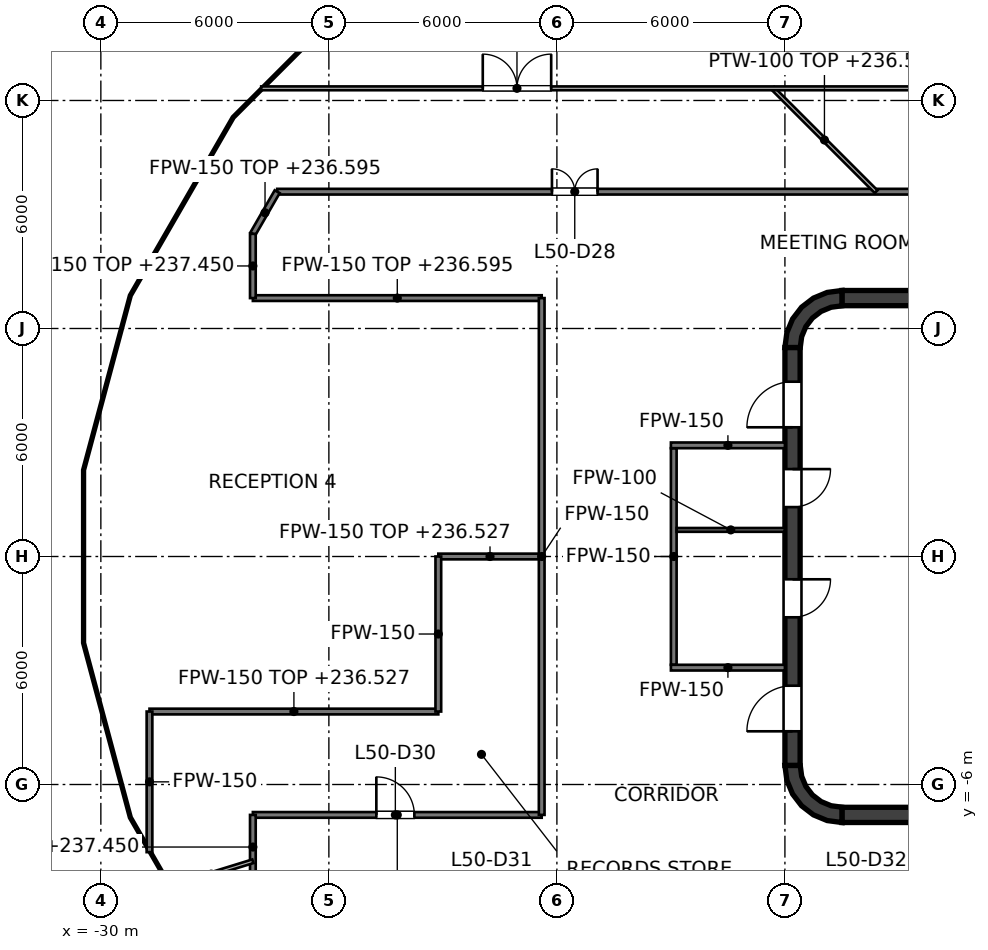
"""IFC4 building model, lengths in metres.
Left out: names, types, materials, properties, quantities, classifications, styles, units other than length and angle.
Written with IfcOpenShell. Run it as: python <this file> out.ifc"""

import sys

from ifc_helpers import new_model, si_unit, direction, frame, frame_2d, origin, place, context, subcontext, project, spatial, polyline, rectangle, outline, extrude, element, fill, save


model = new_model("IFC4")
c1 = context("Model", 3, precision=1e-05, world=origin(), true_north=direction((0.0, 1.0)))
c2 = subcontext(c1, "Body", "Model", "MODEL_VIEW")
j1 = project(units=[si_unit("LENGTHUNIT", "METRE"), si_unit("PLANEANGLEUNIT", "RADIAN")], contexts=[c1])
p1 = place(None, origin())
s1 = spatial("IfcSite", under=j1, at=p1, CompositionType="ELEMENT")
p2 = place(p1, origin())
s2 = spatial("IfcBuilding", under=s1, at=p2, CompositionType="ELEMENT")
p3 = place(p2, frame((0.0, 0.0, 233.6)))
s3 = spatial("IfcBuildingStorey", under=s2, at=p3, CompositionType="ELEMENT", Elevation=233.6)
for number, where, z_axis, x_axis in (
    (1, (-10.5, 6.8, 0.0), (0.0, 0.0, 1.0), (1.0, 0.0, 0.0)),
    (2, (-10.5, -6.8, 0.0), (0.0, 0.0, 1.0), (1.0, 0.0, 0.0)),
):
    element("IfcWall", number, at=place(p3, frame(where, z_axis=z_axis, x_axis=x_axis)), inside=s3, PredefinedType="SHEAR", context=c2, shape_type="SweptSolid", body=[
        extrude(rectangle(XDim=21.0, YDim=0.4, at=frame_2d((10.5, 0.0))), origin(), (0.0, 0.0, 1.0), 4.0),
    ])
p4 = place(p3, frame((-11.8, -5.5, 0.0), z_axis=(0.0, 0.0, 1.0), x_axis=(0.0, 1.0, 0.0)))
e3 = element("IfcWall", 3, at=p4, inside=s3, PredefinedType="SHEAR", context=c2, shape_type="SweptSolid", body=[
    extrude(rectangle(XDim=11.0, YDim=0.4, at=frame_2d((5.5, 0.0))), origin(), (0.0, 0.0, 1.0), 4.0),
])
p5 = place(p4, frame((3.9, 0.0, 0.0)))
e4 = element("IfcOpeningElement", 4, at=p5, cuts=e3, PredefinedType="OPENING", context=c2, shape_type="SweptSolid", body=[
    extrude(rectangle(XDim=1.0, YDim=2.1, at=frame_2d((0.5, 1.05))), frame((0.0, 0.2, 0.0), z_axis=(0.0, -1.0, 0.0), x_axis=(1.0, 0.0, 0.0)), (0.0, 0.0, 1.0), 0.4),
])
p6 = place(p4, frame((6.8, 0.0, 0.0)))
e5 = element("IfcOpeningElement", 5, at=p6, cuts=e3, PredefinedType="OPENING", context=c2, shape_type="SweptSolid", body=[
    extrude(rectangle(XDim=1.0, YDim=2.1, at=frame_2d((0.5, 1.05))), frame((0.0, 0.2, 0.0), z_axis=(0.0, -1.0, 0.0), x_axis=(1.0, 0.0, 0.0)), (0.0, 0.0, 1.0), 0.4),
])
p7 = place(p4, frame((0.9, 0.0, 0.0)))
e6 = element("IfcOpeningElement", 6, at=p7, cuts=e3, PredefinedType="OPENING", context=c2, shape_type="SweptSolid", body=[
    extrude(rectangle(XDim=1.2, YDim=2.1, at=frame_2d((0.6, 1.05))), frame((0.0, 0.2, 0.0), z_axis=(0.0, -1.0, 0.0), x_axis=(1.0, 0.0, 0.0)), (0.0, 0.0, 1.0), 0.4),
])
p8 = place(p4, frame((8.9, 0.0, 0.0)))
e7 = element("IfcOpeningElement", 7, at=p8, cuts=e3, PredefinedType="OPENING", context=c2, shape_type="SweptSolid", body=[
    extrude(rectangle(XDim=1.2, YDim=2.1, at=frame_2d((0.6, 1.05))), frame((0.0, 0.2, 0.0), z_axis=(0.0, -1.0, 0.0), x_axis=(1.0, 0.0, 0.0)), (0.0, 0.0, 1.0), 0.4),
])
p9 = place(p3, origin())
e8 = element("IfcWall", 8, at=p9, inside=s3, PredefinedType="SHEAR", context=c2, shape_type="SweptSolid", body=[
    extrude(outline(polyline([(-12.0, 5.5), (-11.596, 5.5), (-11.559, 5.784), (-11.45, 6.048), (-11.275, 6.275), (-11.048, 6.45), (-10.784, 6.559), (-10.5, 6.596), (-10.5, 7.0), (-10.888, 6.949), (-11.25, 6.799), (-11.561, 6.561), (-11.799, 6.25), (-11.949, 5.888), (-12.0, 5.5)])), origin(), (0.0, 0.0, 1.0), 4.0),
])
e9 = element("IfcWall", 9, at=p9, inside=s3, PredefinedType="SHEAR", context=c2, shape_type="SweptSolid", body=[
    extrude(outline(polyline([(-10.5, -7.0), (-10.5, -6.596), (-10.784, -6.559), (-11.048, -6.45), (-11.275, -6.275), (-11.45, -6.048), (-11.559, -5.784), (-11.596, -5.5), (-12.0, -5.5), (-11.949, -5.888), (-11.799, -6.25), (-11.561, -6.561), (-11.25, -6.799), (-10.888, -6.949), (-10.5, -7.0)])), origin(), (0.0, 0.0, 1.0), 4.0),
])
p10 = place(p3, frame((-9.0, 4.1, 0.0), z_axis=(0.0, 0.0, 1.0), x_axis=(0.0, 1.0, 0.0)))
e10 = element("IfcWall", 10, at=p10, inside=s3, PredefinedType="SOLIDWALL", context=c2, shape_type="SweptSolid", body=[
    extrude(rectangle(XDim=2.5, YDim=0.25, at=frame_2d((1.25, 0.0))), origin(), (0.0, 0.0, 1.0), 3.85),
])
p11 = place(p10, frame((0.65, 0.0, 0.0)))
e11 = element("IfcOpeningElement", 11, at=p11, cuts=e10, PredefinedType="OPENING", context=c2, shape_type="SweptSolid", body=[
    extrude(rectangle(XDim=1.2, YDim=2.1, at=frame_2d((0.6, 1.05))), frame((0.0, 0.125, 0.0), z_axis=(0.0, -1.0, 0.0), x_axis=(1.0, 0.0, 0.0)), (0.0, 0.0, 1.0), 0.25),
])
p12 = place(p3, frame((-9.0, -6.6, 0.0), z_axis=(0.0, 0.0, 1.0), x_axis=(0.0, 1.0, 0.0)))
e12 = element("IfcWall", 12, at=p12, inside=s3, PredefinedType="PARTITIONING", context=c2, shape_type="SweptSolid", body=[
    extrude(rectangle(XDim=2.5, YDim=0.25, at=frame_2d((1.25, 0.0))), origin(), (0.0, 0.0, 1.0), 3.85),
])
p13 = place(p12, frame((0.75, 0.0, 0.0)))
e13 = element("IfcOpeningElement", 13, at=p13, cuts=e12, PredefinedType="OPENING", context=c2, shape_type="SweptSolid", body=[
    extrude(rectangle(XDim=1.0, YDim=2.1, at=frame_2d((0.5, 1.05))), frame((0.0, 0.125, 0.0), z_axis=(0.0, -1.0, 0.0), x_axis=(1.0, 0.0, 0.0)), (0.0, 0.0, 1.0), 0.25),
])
p14 = place(p3, frame((-9.125, 1.525, 0.0), z_axis=(0.0, 0.0, 1.0), x_axis=(1.0, 0.0, 0.0)))
e14 = element("IfcWall", 14, at=p14, inside=s3, PredefinedType="SOLIDWALL", context=c2, shape_type="SweptSolid", body=[
    extrude(rectangle(XDim=8.35, YDim=0.25, at=frame_2d((4.175, 0.0))), origin(), (0.0, 0.0, 1.0), 3.85),
])
p15 = place(p14, frame((0.925, 0.0, 0.0)))
e15 = element("IfcOpeningElement", 15, at=p15, cuts=e14, PredefinedType="OPENING", context=c2, shape_type="SweptSolid", body=[
    extrude(rectangle(XDim=1.1, YDim=2.1, at=frame_2d((0.55, 1.05))), frame((0.0, 0.125, 0.0), z_axis=(0.0, -1.0, 0.0), x_axis=(1.0, 0.0, 0.0)), (0.0, 0.0, 1.0), 0.25),
])
p16 = place(p14, frame((3.625, 0.0, 0.0)))
e16 = element("IfcOpeningElement", 16, at=p16, cuts=e14, PredefinedType="OPENING", context=c2, shape_type="SweptSolid", body=[
    extrude(rectangle(XDim=1.1, YDim=2.1, at=frame_2d((0.55, 1.05))), frame((0.0, 0.125, 0.0), z_axis=(0.0, -1.0, 0.0), x_axis=(1.0, 0.0, 0.0)), (0.0, 0.0, 1.0), 0.25),
])
p17 = place(p14, frame((6.325, 0.0, 0.0)))
e17 = element("IfcOpeningElement", 17, at=p17, cuts=e14, PredefinedType="OPENING", context=c2, shape_type="SweptSolid", body=[
    extrude(rectangle(XDim=1.1, YDim=2.1, at=frame_2d((0.55, 1.05))), frame((0.0, 0.125, 0.0), z_axis=(0.0, -1.0, 0.0), x_axis=(1.0, 0.0, 0.0)), (0.0, 0.0, 1.0), 0.25),
])
p18 = place(p3, frame((-9.125, 3.975, 0.0), z_axis=(0.0, 0.0, 1.0), x_axis=(1.0, 0.0, 0.0)))
e18 = element("IfcWall", 18, at=p18, inside=s3, PredefinedType="SOLIDWALL", context=c2, shape_type="SweptSolid", body=[
    extrude(rectangle(XDim=8.35, YDim=0.25, at=frame_2d((4.175, 0.0))), origin(), (0.0, 0.0, 1.0), 3.85),
])
p19 = place(p3, frame((-9.0, 1.65, 0.0), z_axis=(0.0, 0.0, 1.0), x_axis=(0.0, 1.0, 0.0)))
e19 = element("IfcWall", 19, at=p19, inside=s3, PredefinedType="SOLIDWALL", context=c2, shape_type="SweptSolid", body=[
    extrude(rectangle(XDim=2.2, YDim=0.25, at=frame_2d((1.1, 0.0))), origin(), (0.0, 0.0, 1.0), 3.85),
])
p20 = place(p3, frame((-9.125, -1.525, 0.0), z_axis=(0.0, 0.0, 1.0), x_axis=(1.0, 0.0, 0.0)))
e20 = element("IfcWall", 20, at=p20, inside=s3, PredefinedType="SOLIDWALL", context=c2, shape_type="SweptSolid", body=[
    extrude(rectangle(XDim=18.25, YDim=0.25, at=frame_2d((9.125, 0.0))), origin(), (0.0, 0.0, 1.0), 3.85),
])
p21 = place(p20, frame((7.15, 0.0, 0.0)))
e21 = element("IfcOpeningElement", 21, at=p21, cuts=e20, PredefinedType="OPENING", context=c2, shape_type="SweptSolid", body=[
    extrude(rectangle(XDim=1.2, YDim=2.1, at=frame_2d((0.6, 1.05))), frame((0.0, 0.125, 0.0), z_axis=(0.0, -1.0, 0.0), x_axis=(1.0, 0.0, 0.0)), (0.0, 0.0, 1.0), 0.25),
])
p22 = place(p20, frame((10.2, 0.0, 0.0)))
e22 = element("IfcOpeningElement", 22, at=p22, cuts=e20, PredefinedType="OPENING", context=c2, shape_type="SweptSolid", body=[
    extrude(rectangle(XDim=1.2, YDim=2.1, at=frame_2d((0.6, 1.05))), frame((0.0, 0.125, 0.0), z_axis=(0.0, -1.0, 0.0), x_axis=(1.0, 0.0, 0.0)), (0.0, 0.0, 1.0), 0.25),
])
p23 = place(p20, frame((16.075, 0.0, 0.0)))
e23 = element("IfcOpeningElement", 23, at=p23, cuts=e20, PredefinedType="OPENING", context=c2, shape_type="SweptSolid", body=[
    extrude(rectangle(XDim=1.0, YDim=2.1, at=frame_2d((0.5, 1.05))), frame((0.0, 0.125, 0.0), z_axis=(0.0, -1.0, 0.0), x_axis=(1.0, 0.0, 0.0)), (0.0, 0.0, 1.0), 0.25),
])
p24 = place(p3, frame((-9.125, -3.975, 0.0), z_axis=(0.0, 0.0, 1.0), x_axis=(1.0, 0.0, 0.0)))
e24 = element("IfcWall", 24, at=p24, inside=s3, PredefinedType="SOLIDWALL", context=c2, shape_type="SweptSolid", body=[
    extrude(rectangle(XDim=12.4, YDim=0.25, at=frame_2d((6.2, 0.0))), origin(), (0.0, 0.0, 1.0), 3.85),
])
p25 = place(p24, frame((1.05, 0.0, 0.0)))
e25 = element("IfcOpeningElement", 25, at=p25, cuts=e24, PredefinedType="OPENING", context=c2, shape_type="SweptSolid", body=[
    extrude(rectangle(XDim=1.2, YDim=2.1, at=frame_2d((0.6, 1.05))), frame((0.0, 0.125, 0.0), z_axis=(0.0, -1.0, 0.0), x_axis=(1.0, 0.0, 0.0)), (0.0, 0.0, 1.0), 0.25),
])
p26 = place(p24, frame((4.1, 0.0, 0.0)))
e26 = element("IfcOpeningElement", 26, at=p26, cuts=e24, PredefinedType="OPENING", context=c2, shape_type="SweptSolid", body=[
    extrude(rectangle(XDim=1.2, YDim=2.1, at=frame_2d((0.6, 1.05))), frame((0.0, 0.125, 0.0), z_axis=(0.0, -1.0, 0.0), x_axis=(1.0, 0.0, 0.0)), (0.0, 0.0, 1.0), 0.25),
])
p27 = place(p3, frame((-9.0, -3.85, 0.0), z_axis=(0.0, 0.0, 1.0), x_axis=(0.0, 1.0, 0.0)))
e27 = element("IfcWall", 27, at=p27, inside=s3, PredefinedType="SOLIDWALL", context=c2, shape_type="SweptSolid", body=[
    extrude(rectangle(XDim=2.2, YDim=0.25, at=frame_2d((1.1, 0.0))), origin(), (0.0, 0.0, 1.0), 3.85),
])
p28 = place(p3, frame((-14.925, -2.85, 0.0), z_axis=(0.0, 0.0, 1.0), x_axis=(0.0, 1.0, 0.0)))
e28 = element("IfcWall", 28, at=p28, inside=s3, PredefinedType="PARTITIONING", context=c2, shape_type="SweptSolid", body=[
    extrude(rectangle(XDim=5.7, YDim=0.15, at=frame_2d((2.85, 0.0))), origin(), (0.0, 0.0, 1.0), 2.918),
])
for number, where, z_axis, x_axis in (
    (29, (-15.0, 2.925, 0.0), (0.0, 0.0, 1.0), (1.0, 0.0, 0.0)),
    (30, (-15.0, -2.925, 0.0), (0.0, 0.0, 1.0), (1.0, 0.0, 0.0)),
):
    element("IfcWall", number, at=place(p3, frame(where, z_axis=z_axis, x_axis=x_axis)), inside=s3, PredefinedType="PARTITIONING", context=c2, shape_type="SweptSolid", body=[
        extrude(rectangle(XDim=3.0, YDim=0.15, at=frame_2d((1.5, 0.0))), origin(), (0.0, 0.0, 1.0), 2.918),
    ])
p29 = place(p3, frame((-14.85, 0.7, 0.0), z_axis=(0.0, 0.0, 1.0), x_axis=(1.0, 0.0, 0.0)))
e31 = element("IfcWall", 31, at=p29, inside=s3, PredefinedType="PARTITIONING", context=c2, shape_type="SweptSolid", body=[
    extrude(rectangle(XDim=2.85, YDim=0.1, at=frame_2d((1.425, 0.0))), origin(), (0.0, 0.0, 1.0), 2.918),
])
p30 = place(p3, frame((-26.0, -6.8, 0.0), z_axis=(0.0, 0.0, 1.0), x_axis=(1.0, 0.0, 0.0)))
e32 = element("IfcWall", 32, at=p30, inside=s3, PredefinedType="PARTITIONING", context=c2, shape_type="SweptSolid", body=[
    extrude(rectangle(XDim=7.6, YDim=0.15, at=frame_2d((3.8, 0.0))), origin(), (0.0, 0.0, 1.0), 2.995),
])
p31 = place(p30, frame((3.249, 0.0, 0.0)))
e33 = element("IfcOpeningElement", 33, at=p31, cuts=e32, PredefinedType="OPENING", context=c2, shape_type="SweptSolid", body=[
    extrude(rectangle(XDim=1.0, YDim=2.1, at=frame_2d((0.5, 1.05))), frame((0.0, 0.075, 0.0), z_axis=(0.0, -1.0, 0.0), x_axis=(1.0, 0.0, 0.0)), (0.0, 0.0, 1.0), 0.15),
])
p32 = place(p3, frame((-28.72, -4.08, 0.0), z_axis=(0.0, 0.0, 1.0), x_axis=(1.0, 0.0, 0.0)))
e34 = element("IfcWall", 34, at=p32, inside=s3, PredefinedType="PARTITIONING", context=c2, shape_type="SweptSolid", body=[
    extrude(rectangle(XDim=7.6, YDim=0.15, at=frame_2d((3.8, 0.0))), origin(), (0.0, 0.0, 1.0), 2.927),
])
p33 = place(p3, frame((-21.12, 0.0, 0.0), z_axis=(0.0, 0.0, 1.0), x_axis=(1.0, 0.0, 0.0)))
e35 = element("IfcWall", 35, at=p33, inside=s3, PredefinedType="PARTITIONING", context=c2, shape_type="SweptSolid", body=[
    extrude(rectangle(XDim=2.72, YDim=0.15, at=frame_2d((1.36, 0.0))), origin(), (0.0, 0.0, 1.0), 2.927),
])
p34 = place(p3, frame((-26.0, 6.8, 0.0), z_axis=(0.0, 0.0, 1.0), x_axis=(1.0, 0.0, 0.0)))
e36 = element("IfcWall", 36, at=p34, inside=s3, PredefinedType="PARTITIONING", context=c2, shape_type="SweptSolid", body=[
    extrude(rectangle(XDim=7.6, YDim=0.15, at=frame_2d((3.8, 0.0))), origin(), (0.0, 0.0, 1.0), 2.995),
])
p35 = place(p3, frame((-25.36, 9.6, 0.0), z_axis=(0.0, 0.0, 1.0), x_axis=(1.0, 0.0, 0.0)))
e37 = element("IfcWall", 37, at=p35, inside=s3, PredefinedType="PARTITIONING", context=c2, shape_type="SweptSolid", body=[
    extrude(rectangle(XDim=50.721, YDim=0.15, at=frame_2d((25.361, 0.0))), origin(), (0.0, 0.0, 1.0), 2.927),
])
p36 = place(p35, frame((36.951, 0.0, 0.0)))
e38 = element("IfcOpeningElement", 38, at=p36, cuts=e37, PredefinedType="OPENING", context=c2, shape_type="SweptSolid", body=[
    extrude(rectangle(XDim=1.0, YDim=2.1, at=frame_2d((0.5, 1.05))), frame((0.0, 0.075, 0.0), z_axis=(0.0, -1.0, 0.0), x_axis=(1.0, 0.0, 0.0)), (0.0, 0.0, 1.0), 0.15),
])
p37 = place(p35, frame((30.168, 0.0, 0.0)))
e39 = element("IfcOpeningElement", 39, at=p37, cuts=e37, PredefinedType="OPENING", context=c2, shape_type="SweptSolid", body=[
    extrude(rectangle(XDim=1.0, YDim=2.1, at=frame_2d((0.5, 1.05))), frame((0.0, 0.075, 0.0), z_axis=(0.0, -1.0, 0.0), x_axis=(1.0, 0.0, 0.0)), (0.0, 0.0, 1.0), 0.15),
])
p38 = place(p35, frame((25.004, 0.0, 0.0)))
e40 = element("IfcOpeningElement", 40, at=p38, cuts=e37, PredefinedType="OPENING", context=c2, shape_type="SweptSolid", body=[
    extrude(rectangle(XDim=1.0, YDim=2.1, at=frame_2d((0.5, 1.05))), frame((0.0, 0.075, 0.0), z_axis=(0.0, -1.0, 0.0), x_axis=(1.0, 0.0, 0.0)), (0.0, 0.0, 1.0), 0.15),
])
p39 = place(p35, frame((18.774, 0.0, 0.0)))
e41 = element("IfcOpeningElement", 41, at=p39, cuts=e37, PredefinedType="OPENING", context=c2, shape_type="SweptSolid", body=[
    extrude(rectangle(XDim=1.0, YDim=2.1, at=frame_2d((0.5, 1.05))), frame((0.0, 0.075, 0.0), z_axis=(0.0, -1.0, 0.0), x_axis=(1.0, 0.0, 0.0)), (0.0, 0.0, 1.0), 0.15),
])
p40 = place(p35, frame((7.23, 0.0, 0.0)))
e42 = element("IfcOpeningElement", 42, at=p40, cuts=e37, PredefinedType="OPENING", context=c2, shape_type="SweptSolid", body=[
    extrude(rectangle(XDim=1.2, YDim=2.1, at=frame_2d((0.6, 1.05))), frame((0.0, 0.075, 0.0), z_axis=(0.0, -1.0, 0.0), x_axis=(1.0, 0.0, 0.0)), (0.0, 0.0, 1.0), 0.15),
])
p41 = place(p3, frame((-26.0, 8.491, 0.0), z_axis=(0.0, 0.0, 1.0), x_axis=(0.499953532967, 0.866052229876, 0.0)))
e43 = element("IfcWall", 43, at=p41, inside=s3, PredefinedType="PARTITIONING", context=c2, shape_type="SweptSolid", body=[
    extrude(rectangle(XDim=1.28, YDim=0.15, at=frame_2d((0.64, 0.0))), origin(), (0.0, 0.0, 1.0), 2.995),
])
p42 = place(p3, frame((-18.4, -6.8, 0.0), z_axis=(0.0, 0.0, 1.0), x_axis=(0.0, 1.0, 0.0)))
e44 = element("IfcWall", 44, at=p42, inside=s3, PredefinedType="PARTITIONING", context=c2, shape_type="SweptSolid", body=[
    extrude(rectangle(XDim=13.6, YDim=0.15, at=frame_2d((6.8, 0.0))), origin(), (0.0, 0.0, 1.0), 2.918),
])
p43 = place(p3, frame((-21.12, -4.08, 0.0), z_axis=(0.0, 0.0, 1.0), x_axis=(0.0, 1.0, 0.0)))
e45 = element("IfcWall", 45, at=p43, inside=s3, PredefinedType="PARTITIONING", context=c2, shape_type="SweptSolid", body=[
    extrude(rectangle(XDim=4.08, YDim=0.15, at=frame_2d((2.04, 0.0))), origin(), (0.0, 0.0, 1.0), 2.918),
])
for number, where, z_axis, x_axis in (
    (46, (-26.0, -8.491, 0.0), (0.0, 0.0, 1.0), (0.0, 1.0, 0.0)),
    (47, (-26.0, 6.8, 0.0), (0.0, 0.0, 1.0), (0.0, 1.0, 0.0)),
):
    element("IfcWall", number, at=place(p3, frame(where, z_axis=z_axis, x_axis=x_axis)), inside=s3, PredefinedType="PARTITIONING", context=c2, shape_type="SweptSolid", body=[
        extrude(rectangle(XDim=1.691, YDim=0.15, at=frame_2d((0.845, 0.0))), origin(), (0.0, 0.0, 1.0), 3.85),
    ])
p44 = place(p3, frame((-28.72, -7.78, 0.0), z_axis=(0.0, 0.0, 1.0), x_axis=(0.0, 1.0, 0.0)))
e48 = element("IfcWall", 48, at=p44, inside=s3, PredefinedType="PARTITIONING", context=c2, shape_type="SweptSolid", body=[
    extrude(rectangle(XDim=3.7, YDim=0.15, at=frame_2d((1.85, 0.0))), origin(), (0.0, 0.0, 1.0), 2.918),
])
p45 = place(p3, frame((-12.32, 12.32, 0.0), z_axis=(0.0, 0.0, 1.0), x_axis=(0.707106781187, -0.707106781187, 0.0)))
e49 = element("IfcWall", 49, at=p45, inside=s3, PredefinedType="PARTITIONING", context=c2, shape_type="SweptSolid", body=[
    extrude(rectangle(XDim=3.847, YDim=0.1, at=frame_2d((1.923, 0.0))), origin(), (0.0, 0.0, 1.0), 2.995),
])
p46 = place(p3, frame((-25.781, 12.32, 0.0), z_axis=(0.0, 0.0, 1.0), x_axis=(1.0, 0.0, 0.0)))
e50 = element("IfcWall", 50, at=p46, inside=s3, PredefinedType="PARTITIONING", context=c2, shape_type="SweptSolid", body=[
    extrude(rectangle(XDim=47.12, YDim=0.1, at=frame_2d((23.56, 0.0))), origin(), (0.0, 0.0, 1.0), 2.927),
])
p47 = place(p46, frame((25.081, 0.0, 0.0)))
e51 = element("IfcOpeningElement", 51, at=p47, cuts=e50, PredefinedType="OPENING", context=c2, shape_type="SweptSolid", body=[
    extrude(rectangle(XDim=1.8, YDim=2.1, at=frame_2d((0.9, 1.05))), frame((0.0, 0.05, 0.0), z_axis=(0.0, -1.0, 0.0), x_axis=(1.0, 0.0, 0.0)), (0.0, 0.0, 1.0), 0.1),
])
p48 = place(p46, frame((5.831, 0.0, 0.0)))
e52 = element("IfcOpeningElement", 52, at=p48, cuts=e50, PredefinedType="OPENING", context=c2, shape_type="SweptSolid", body=[
    extrude(rectangle(XDim=1.8, YDim=2.1, at=frame_2d((0.9, 1.05))), frame((0.0, 0.05, 0.0), z_axis=(0.0, -1.0, 0.0), x_axis=(1.0, 0.0, 0.0)), (0.0, 0.0, 1.0), 0.1),
])
p49 = place(p3, frame((-28.191, -8.696, 0.0), z_axis=(0.0, 0.0, 1.0), x_axis=(0.955546181959, 0.294841472904, 0.0)))
e53 = element("IfcWall", 53, at=p49, inside=s3, PredefinedType="PARTITIONING", context=c2, shape_type="SweptSolid", body=[
    extrude(rectangle(XDim=2.293, YDim=0.1, at=frame_2d((1.146, 0.0))), origin(), (0.0, 0.0, 1.0), 3.527),
])
p50 = place(p11, origin())
e54 = element("IfcDoor", 54, at=p50, inside=s3, OperationType="SINGLE_SWING_RIGHT", PredefinedType="DOOR", context=c2, shape_type="SweptSolid", body=[
    extrude(rectangle(XDim=1.2, YDim=2.1, at=frame_2d((0.6, 1.05))), frame((0.0, 0.025, 0.0), z_axis=(0.0, -1.0, 0.0), x_axis=(1.0, 0.0, 0.0)), (0.0, 0.0, 1.0), 0.05),
])
fill(e11, e54)
p51 = place(p13, origin())
e55 = element("IfcDoor", 55, at=p51, inside=s3, OperationType="SINGLE_SWING_LEFT", PredefinedType="DOOR", context=c2, shape_type="SweptSolid", body=[
    extrude(rectangle(XDim=1.0, YDim=2.1, at=frame_2d((0.5, 1.05))), frame((0.0, 0.025, 0.0), z_axis=(0.0, -1.0, 0.0), x_axis=(1.0, 0.0, 0.0)), (0.0, 0.0, 1.0), 0.05),
])
fill(e13, e55)
p52 = place(p5, origin())
e56 = element("IfcDoor", 56, at=p52, inside=s3, OperationType="SINGLE_SWING_RIGHT", PredefinedType="DOOR", context=c2, shape_type="SweptSolid", body=[
    extrude(rectangle(XDim=1.0, YDim=2.1, at=frame_2d((0.5, 1.05))), frame((0.0, 0.025, 0.0), z_axis=(0.0, -1.0, 0.0), x_axis=(1.0, 0.0, 0.0)), (0.0, 0.0, 1.0), 0.05),
])
fill(e4, e56)
p53 = place(p6, origin())
e57 = element("IfcDoor", 57, at=p53, inside=s3, OperationType="SINGLE_SWING_RIGHT", PredefinedType="DOOR", context=c2, shape_type="SweptSolid", body=[
    extrude(rectangle(XDim=1.0, YDim=2.1, at=frame_2d((0.5, 1.05))), frame((0.0, 0.025, 0.0), z_axis=(0.0, -1.0, 0.0), x_axis=(1.0, 0.0, 0.0)), (0.0, 0.0, 1.0), 0.05),
])
fill(e5, e57)
p54 = place(p7, origin())
e58 = element("IfcDoor", 58, at=p54, inside=s3, OperationType="SINGLE_SWING_LEFT", PredefinedType="DOOR", context=c2, shape_type="SweptSolid", body=[
    extrude(rectangle(XDim=1.2, YDim=2.1, at=frame_2d((0.6, 1.05))), frame((0.0, 0.025, 0.0), z_axis=(0.0, -1.0, 0.0), x_axis=(1.0, 0.0, 0.0)), (0.0, 0.0, 1.0), 0.05),
])
fill(e6, e58)
p55 = place(p8, origin())
e59 = element("IfcDoor", 59, at=p55, inside=s3, OperationType="SINGLE_SWING_LEFT", PredefinedType="DOOR", context=c2, shape_type="SweptSolid", body=[
    extrude(rectangle(XDim=1.2, YDim=2.1, at=frame_2d((0.6, 1.05))), frame((0.0, 0.025, 0.0), z_axis=(0.0, -1.0, 0.0), x_axis=(1.0, 0.0, 0.0)), (0.0, 0.0, 1.0), 0.05),
])
fill(e7, e59)
p56 = place(p40, origin())
e60 = element("IfcDoor", 60, at=p56, inside=s3, OperationType="DOUBLE_DOOR_SINGLE_SWING", PredefinedType="DOOR", context=c2, shape_type="SweptSolid", body=[
    extrude(rectangle(XDim=1.2, YDim=2.1, at=frame_2d((0.6, 1.05))), frame((0.0, 0.025, 0.0), z_axis=(0.0, -1.0, 0.0), x_axis=(1.0, 0.0, 0.0)), (0.0, 0.0, 1.0), 0.05),
])
fill(e42, e60)
p57 = place(p48, origin())
e61 = element("IfcDoor", 61, at=p57, inside=s3, OperationType="DOUBLE_DOOR_SINGLE_SWING", PredefinedType="DOOR", context=c2, shape_type="SweptSolid", body=[
    extrude(rectangle(XDim=1.8, YDim=2.1, at=frame_2d((0.9, 1.05))), frame((0.0, 0.025, 0.0), z_axis=(0.0, -1.0, 0.0), x_axis=(1.0, 0.0, 0.0)), (0.0, 0.0, 1.0), 0.05),
])
fill(e52, e61)
p58 = place(p31, origin())
e62 = element("IfcDoor", 62, at=p58, inside=s3, OperationType="SINGLE_SWING_LEFT", PredefinedType="DOOR", context=c2, shape_type="SweptSolid", body=[
    extrude(rectangle(XDim=1.0, YDim=2.1, at=frame_2d((0.5, 1.05))), frame((0.0, 0.025, 0.0), z_axis=(0.0, -1.0, 0.0), x_axis=(1.0, 0.0, 0.0)), (0.0, 0.0, 1.0), 0.05),
])
fill(e33, e62)
save(model, sys.argv[1])
